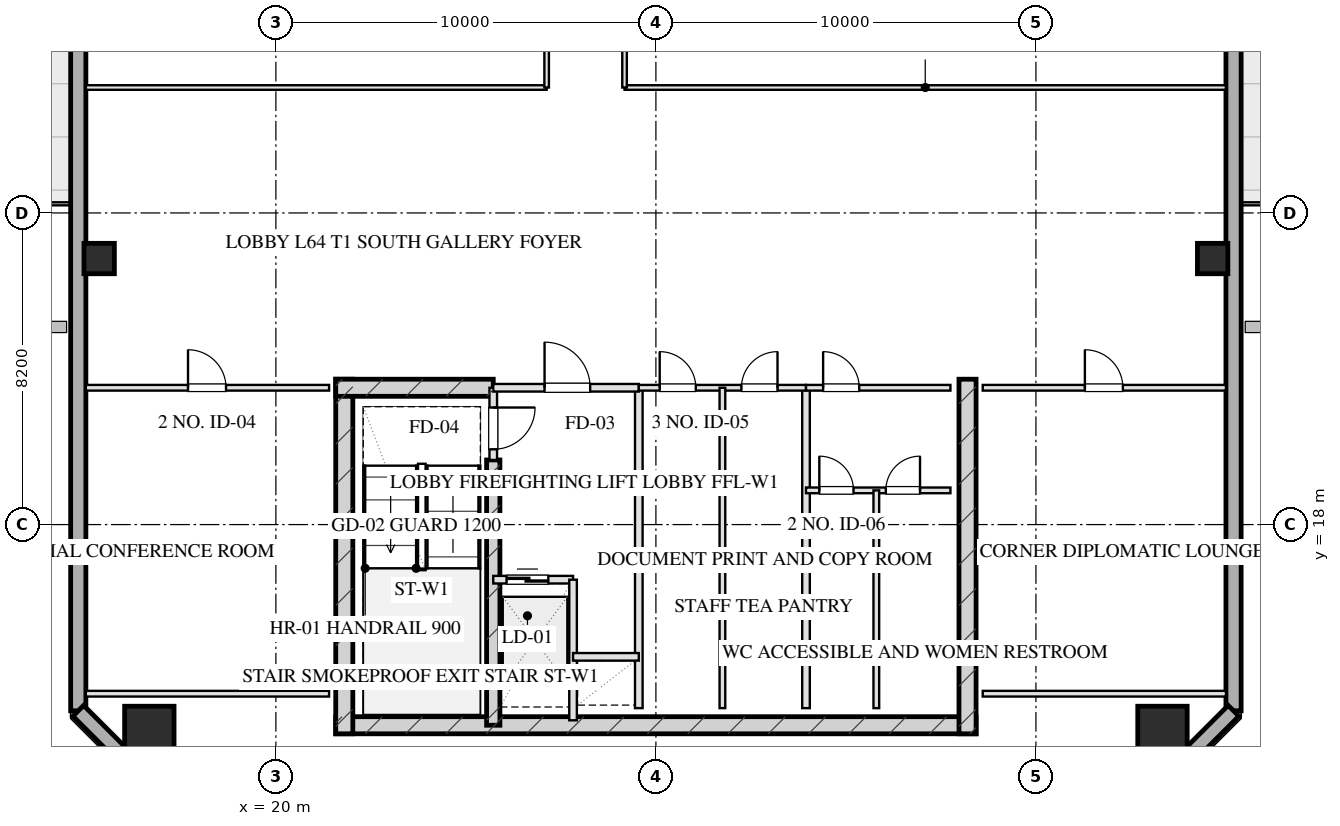
"""IFC4 building model, lengths in metres.
Left out: names, types, materials, properties, quantities, classifications, styles, units other than length and angle.
Written with IfcOpenShell. Run it as: python <this file> out.ifc"""

import sys

from ifc_helpers import new_model, si_unit, direction, frame, frame_2d, origin, origin_2d, place, context, subcontext, project, spatial, rectangle, hollow_rectangle, extrude, element, fill, save


model = new_model("IFC4")
c1 = context("Model", 3, precision=1e-05, world=origin(), true_north=direction((0.0, 1.0)))
c2 = subcontext(c1, "Body", "Model", "MODEL_VIEW")
j1 = project(units=[si_unit("LENGTHUNIT", "METRE"), si_unit("PLANEANGLEUNIT", "RADIAN")], contexts=[c1])
p1 = place(None, origin())
s1 = spatial("IfcSite", under=j1, at=p1, CompositionType="ELEMENT")
p2 = place(p1, origin())
s2 = spatial("IfcBuilding", under=s1, at=p2, CompositionType="ELEMENT")
p3 = place(p2, frame((0.0, 0.0, 237.6)))
s3 = spatial("IfcBuildingStorey", under=s2, at=p3, CompositionType="ELEMENT", Elevation=237.6)
p4 = place(p3, frame((21.575, 12.72, 0.0), z_axis=(0.0, 0.0, 1.0), x_axis=(1.0, 0.0, 0.0)))
e1 = element("IfcWall", 1, at=p4, inside=s3, PredefinedType="SHEAR", context=c2, shape_type="SweptSolid", body=[
    extrude(rectangle(XDim=16.85, YDim=0.45, at=frame_2d((8.425, 0.0))), origin(), (0.0, 0.0, 1.0), 3.2),
])
for number, where, z_axis, x_axis in (
    (2, (21.8, 21.825, 0.0), (0.0, 0.0, 1.0), (0.0, -1.0, 0.0)),
    (3, (38.2, 21.825, 0.0), (0.0, 0.0, 1.0), (0.0, -1.0, 0.0)),
):
    element("IfcWall", number, at=place(p3, frame(where, z_axis=z_axis, x_axis=x_axis)), inside=s3, PredefinedType="SHEAR", context=c2, shape_type="SweptSolid", body=[
        extrude(rectangle(XDim=9.33, YDim=0.45, at=frame_2d((4.665, 0.0))), origin(), (0.0, 0.0, 1.0), 3.2),
    ])
p5 = place(p3, frame((25.72, 19.7, 0.0), z_axis=(0.0, 0.0, 1.0), x_axis=(0.0, -1.0, 0.0)))
e4 = element("IfcWall", 4, at=p5, inside=s3, PredefinedType="SHEAR", context=c2, shape_type="SweptSolid", body=[
    extrude(rectangle(XDim=6.98, YDim=0.35, at=frame_2d((3.49, 0.0))), origin(), (0.0, 0.0, 1.0), 3.2),
])
p6 = place(p3, frame((21.575, 21.6, 0.0), z_axis=(0.0, 0.0, 1.0), x_axis=(1.0, 0.0, 0.0)))
e5 = element("IfcWall", 5, at=p6, inside=s3, PredefinedType="SHEAR", context=c2, shape_type="SweptSolid", body=[
    extrude(rectangle(XDim=4.145, YDim=0.45, at=frame_2d((2.073, 0.0))), origin(), (0.0, 0.0, 1.0), 3.2),
])
for number, where, z_axis, x_axis in (
    (6, (16.67, 12.57, 0.0), (0.0, 0.0, 1.0), (1.0, 0.0, 0.0)),
    (7, (43.33, 12.57, 0.0), (0.0, 0.0, 1.0), (1.0, 0.0, 0.0)),
):
    element("IfcColumn", number, at=place(p3, frame(where, z_axis=z_axis, x_axis=x_axis)), inside=s3, PredefinedType="COLUMN", context=c2, shape_type="SweptSolid", body=[
        extrude(hollow_rectangle(XDim=1.3, YDim=1.3, WallThickness=0.045, at=origin_2d()), origin(), (0.0, 0.0, 1.0), 3.201),
    ])
for number, where, z_axis, x_axis in (
    (8, (15.35, 25.0, 0.0), (0.0, 0.0, 1.0), (1.0, 0.0, 0.0)),
    (9, (44.65, 25.0, 0.0), (0.0, 0.0, 1.0), (1.0, 0.0, 0.0)),
):
    element("IfcColumn", number, at=place(p3, frame(where, z_axis=z_axis, x_axis=x_axis)), inside=s3, PredefinedType="COLUMN", context=c2, shape_type="SweptSolid", body=[
        extrude(hollow_rectangle(XDim=0.8, YDim=0.8, WallThickness=0.028, at=origin_2d()), origin(), (0.0, 0.0, 1.0), 3.201),
    ])
p7 = place(p3, frame((14.8, 13.1, 0.0), z_axis=(0.0, 0.0, 1.0), x_axis=(0.0, 1.0, 0.0)))
e10 = element("IfcWall", 10, at=p7, inside=s3, PredefinedType="SOLIDWALL", context=c2, shape_type="SweptSolid", body=[
    extrude(rectangle(XDim=41.8, YDim=0.4, at=frame_2d((20.9, 0.0))), origin(), (0.0, 0.0, 1.0), 2.36),
])
p8 = place(p7, frame((22.525, 0.0, 0.75)))
e11 = element("IfcOpeningElement", 11, at=p8, cuts=e10, PredefinedType="OPENING", context=c2, shape_type="SweptSolid", body=[
    extrude(rectangle(XDim=1.95, YDim=1.21, at=frame_2d((0.975, 0.605))), frame((0.0, 0.21, 0.0), z_axis=(0.0, -1.0, 0.0), x_axis=(1.0, 0.0, 0.0)), (0.0, 0.0, 1.0), 0.42),
])
p9 = place(p7, frame((26.325, 0.0, 0.75)))
e12 = element("IfcOpeningElement", 12, at=p9, cuts=e10, PredefinedType="OPENING", context=c2, shape_type="SweptSolid", body=[
    extrude(rectangle(XDim=1.95, YDim=1.21, at=frame_2d((0.975, 0.605))), frame((0.0, 0.21, 0.0), z_axis=(0.0, -1.0, 0.0), x_axis=(1.0, 0.0, 0.0)), (0.0, 0.0, 1.0), 0.42),
])
p10 = place(p7, frame((17.5, 0.0, 0.0)))
e13 = element("IfcOpeningElement", 13, at=p10, cuts=e10, PredefinedType="OPENING", context=c2, shape_type="SweptSolid", body=[
    extrude(rectangle(XDim=1.1, YDim=2.15, at=frame_2d((0.55, 1.075))), frame((0.0, 0.21, 0.0), z_axis=(0.0, -1.0, 0.0), x_axis=(1.0, 0.0, 0.0)), (0.0, 0.0, 1.0), 0.42),
])
p11 = place(p3, frame((45.2, 54.9, 0.0), z_axis=(0.0, 0.0, 1.0), x_axis=(0.0, -1.0, 0.0)))
e14 = element("IfcWall", 14, at=p11, inside=s3, PredefinedType="SOLIDWALL", context=c2, shape_type="SweptSolid", body=[
    extrude(rectangle(XDim=41.8, YDim=0.4, at=frame_2d((20.9, 0.0))), origin(), (0.0, 0.0, 1.0), 2.36),
])
p12 = place(p11, frame((17.325, 0.0, 0.75)))
e15 = element("IfcOpeningElement", 15, at=p12, cuts=e14, PredefinedType="OPENING", context=c2, shape_type="SweptSolid", body=[
    extrude(rectangle(XDim=1.95, YDim=1.21, at=frame_2d((0.975, 0.605))), frame((0.0, 0.21, 0.0), z_axis=(0.0, -1.0, 0.0), x_axis=(1.0, 0.0, 0.0)), (0.0, 0.0, 1.0), 0.42),
])
p13 = place(p11, frame((13.525, 0.0, 0.75)))
e16 = element("IfcOpeningElement", 16, at=p13, cuts=e14, PredefinedType="OPENING", context=c2, shape_type="SweptSolid", body=[
    extrude(rectangle(XDim=1.95, YDim=1.21, at=frame_2d((0.975, 0.605))), frame((0.0, 0.21, 0.0), z_axis=(0.0, -1.0, 0.0), x_axis=(1.0, 0.0, 0.0)), (0.0, 0.0, 1.0), 0.42),
])
p14 = place(p11, frame((23.2, 0.0, 0.0)))
e17 = element("IfcOpeningElement", 17, at=p14, cuts=e14, PredefinedType="OPENING", context=c2, shape_type="SweptSolid", body=[
    extrude(rectangle(XDim=1.1, YDim=2.15, at=frame_2d((0.55, 1.075))), frame((0.0, 0.21, 0.0), z_axis=(0.0, -1.0, 0.0), x_axis=(1.0, 0.0, 0.0)), (0.0, 0.0, 1.0), 0.42),
])
for number, where, z_axis, x_axis in (
    (18, (45.2, 13.1, 0.0), (0.0, 0.0, 1.0), (-0.707, -0.707, 0.0)),
    (19, (17.2, 10.7, 0.0), (0.0, 0.0, 1.0), (-0.707, 0.707, 0.0)),
):
    element("IfcWall", number, at=place(p3, frame(where, z_axis=z_axis, x_axis=x_axis)), inside=s3, PredefinedType="SOLIDWALL", context=c2, shape_type="SweptSolid", body=[
        extrude(rectangle(XDim=3.394, YDim=0.4, at=frame_2d((1.697, 0.0))), origin(), (0.0, 0.0, 1.0), 2.36),
    ])
p15 = place(p3, frame((25.72, 21.6, 0.0), z_axis=(0.0, 0.0, 1.0), x_axis=(0.0, -1.0, 0.0)))
e20 = element("IfcWall", 20, at=p15, inside=s3, PredefinedType="PARTITIONING", context=c2, shape_type="SweptSolid", body=[
    extrude(rectangle(XDim=1.9, YDim=0.2, at=frame_2d((0.95, 0.0))), origin(), (0.0, 0.0, 1.0), 2.925),
])
p16 = place(p15, frame((0.52, 0.0, 0.0)))
e21 = element("IfcOpeningElement", 21, at=p16, cuts=e20, PredefinedType="OPENING", context=c2, shape_type="SweptSolid", body=[
    extrude(rectangle(XDim=1.1, YDim=2.05, at=frame_2d((0.55, 1.025))), frame((0.0, 0.11, 0.0), z_axis=(0.0, -1.0, 0.0), x_axis=(1.0, 0.0, 0.0)), (0.0, 0.0, 1.0), 0.22),
])
p17 = place(p3, frame((29.55, 21.6, 0.0), z_axis=(0.0, 0.0, 1.0), x_axis=(0.0, -1.0, 0.0)))
e22 = element("IfcWall", 22, at=p17, inside=s3, PredefinedType="PARTITIONING", context=c2, shape_type="SweptSolid", body=[
    extrude(rectangle(XDim=8.43, YDim=0.2, at=frame_2d((4.215, 0.0))), origin(), (0.0, 0.0, 1.0), 2.925),
])
p18 = place(p3, frame((25.72, 21.6, 0.0), z_axis=(0.0, 0.0, 1.0), x_axis=(1.0, 0.0, 0.0)))
e23 = element("IfcWall", 23, at=p18, inside=s3, PredefinedType="PARTITIONING", context=c2, shape_type="SweptSolid", body=[
    extrude(rectangle(XDim=3.83, YDim=0.2, at=frame_2d((1.915, 0.0))), origin(), (0.0, 0.0, 1.0), 2.925),
])
p19 = place(p18, frame((1.35, 0.0, 0.0)))
e24 = element("IfcOpeningElement", 24, at=p19, cuts=e23, PredefinedType="OPENING", context=c2, shape_type="SweptSolid", body=[
    extrude(rectangle(XDim=1.2, YDim=2.05, at=frame_2d((0.6, 1.025))), frame((0.0, 0.11, 0.0), z_axis=(0.0, -1.0, 0.0), x_axis=(1.0, 0.0, 0.0)), (0.0, 0.0, 1.0), 0.22),
])
p20 = place(p3, frame((25.72, 16.55, 0.0), z_axis=(0.0, 0.0, 1.0), x_axis=(1.0, 0.0, 0.0)))
e25 = element("IfcWall", 25, at=p20, inside=s3, PredefinedType="PARTITIONING", context=c2, shape_type="SweptSolid", body=[
    extrude(rectangle(XDim=2.1, YDim=0.2, at=frame_2d((1.05, 0.0))), origin(), (0.0, 0.0, 1.0), 2.925),
])
p21 = place(p20, frame((0.35, 0.0, 0.0)))
e26 = element("IfcOpeningElement", 26, at=p21, cuts=e25, PredefinedType="OPENING", context=c2, shape_type="SweptSolid", body=[
    extrude(rectangle(XDim=1.1, YDim=2.05, at=frame_2d((0.55, 1.025))), frame((0.0, 0.11, 0.0), z_axis=(0.0, -1.0, 0.0), x_axis=(1.0, 0.0, 0.0)), (0.0, 0.0, 1.0), 0.22),
])
p22 = place(p3, frame((27.82, 16.55, 0.0), z_axis=(0.0, 0.0, 1.0), x_axis=(0.0, -1.0, 0.0)))
e27 = element("IfcWall", 27, at=p22, inside=s3, PredefinedType="PARTITIONING", context=c2, shape_type="SweptSolid", body=[
    extrude(rectangle(XDim=3.7, YDim=0.2, at=frame_2d((1.85, 0.0))), origin(), (0.0, 0.0, 1.0), 2.925),
])
p23 = place(p3, frame((27.82, 14.52, 0.0), z_axis=(0.0, 0.0, 1.0), x_axis=(1.0, 0.0, 0.0)))
e28 = element("IfcWall", 28, at=p23, inside=s3, PredefinedType="PARTITIONING", context=c2, shape_type="SweptSolid", body=[
    extrude(rectangle(XDim=1.73, YDim=0.2, at=frame_2d((0.865, 0.0))), origin(), (0.0, 0.0, 1.0), 2.925),
])
p24 = place(p3, frame((33.95, 21.6, 0.0), z_axis=(0.0, 0.0, 1.0), x_axis=(0.0, -1.0, 0.0)))
e29 = element("IfcWall", 29, at=p24, inside=s3, PredefinedType="PARTITIONING", context=c2, shape_type="SweptSolid", body=[
    extrude(rectangle(XDim=8.43, YDim=0.2, at=frame_2d((4.215, 0.0))), origin(), (0.0, 0.0, 1.0), 2.925),
])
p25 = place(p3, frame((29.55, 21.6, 0.0), z_axis=(0.0, 0.0, 1.0), x_axis=(1.0, 0.0, 0.0)))
e30 = element("IfcWall", 30, at=p25, inside=s3, PredefinedType="PARTITIONING", context=c2, shape_type="SweptSolid", body=[
    extrude(rectangle(XDim=4.4, YDim=0.15, at=frame_2d((2.2, 0.0))), origin(), (0.0, 0.0, 1.0), 2.925),
])
p26 = place(p25, frame((0.55, 0.0, 0.0)))
e31 = element("IfcOpeningElement", 31, at=p26, cuts=e30, PredefinedType="OPENING", context=c2, shape_type="SweptSolid", body=[
    extrude(rectangle(XDim=0.95, YDim=2.05, at=frame_2d((0.475, 1.025))), frame((0.0, 0.085, 0.0), z_axis=(0.0, -1.0, 0.0), x_axis=(1.0, 0.0, 0.0)), (0.0, 0.0, 1.0), 0.17),
])
p27 = place(p25, frame((2.7, 0.0, 0.0)))
e32 = element("IfcOpeningElement", 32, at=p27, cuts=e30, PredefinedType="OPENING", context=c2, shape_type="SweptSolid", body=[
    extrude(rectangle(XDim=0.95, YDim=2.05, at=frame_2d((0.475, 1.025))), frame((0.0, 0.085, 0.0), z_axis=(0.0, -1.0, 0.0), x_axis=(1.0, 0.0, 0.0)), (0.0, 0.0, 1.0), 0.17),
])
p28 = place(p3, frame((31.75, 21.6, 0.0), z_axis=(0.0, 0.0, 1.0), x_axis=(0.0, -1.0, 0.0)))
e33 = element("IfcWall", 33, at=p28, inside=s3, PredefinedType="PARTITIONING", context=c2, shape_type="SweptSolid", body=[
    extrude(rectangle(XDim=8.43, YDim=0.15, at=frame_2d((4.215, 0.0))), origin(), (0.0, 0.0, 1.0), 2.925),
])
p29 = place(p3, frame((33.95, 21.6, 0.0), z_axis=(0.0, 0.0, 1.0), x_axis=(1.0, 0.0, 0.0)))
e34 = element("IfcWall", 34, at=p29, inside=s3, PredefinedType="PARTITIONING", context=c2, shape_type="SweptSolid", body=[
    extrude(rectangle(XDim=3.8, YDim=0.15, at=frame_2d((1.9, 0.0))), origin(), (0.0, 0.0, 1.0), 2.925),
])
p30 = place(p29, frame((0.45, 0.0, 0.0)))
e35 = element("IfcOpeningElement", 35, at=p30, cuts=e34, PredefinedType="OPENING", context=c2, shape_type="SweptSolid", body=[
    extrude(rectangle(XDim=0.95, YDim=2.05, at=frame_2d((0.475, 1.025))), frame((0.0, 0.085, 0.0), z_axis=(0.0, -1.0, 0.0), x_axis=(1.0, 0.0, 0.0)), (0.0, 0.0, 1.0), 0.17),
])
p31 = place(p3, frame((33.95, 18.9, 0.0), z_axis=(0.0, 0.0, 1.0), x_axis=(1.0, 0.0, 0.0)))
e36 = element("IfcWall", 36, at=p31, inside=s3, PredefinedType="PARTITIONING", context=c2, shape_type="SweptSolid", body=[
    extrude(rectangle(XDim=3.8, YDim=0.15, at=frame_2d((1.9, 0.0))), origin(), (0.0, 0.0, 1.0), 2.925),
])
p32 = place(p31, frame((0.35, 0.0, 0.0)))
e37 = element("IfcOpeningElement", 37, at=p32, cuts=e36, PredefinedType="OPENING", context=c2, shape_type="SweptSolid", body=[
    extrude(rectangle(XDim=0.9, YDim=2.05, at=frame_2d((0.45, 1.025))), frame((0.0, 0.085, 0.0), z_axis=(0.0, -1.0, 0.0), x_axis=(1.0, 0.0, 0.0)), (0.0, 0.0, 1.0), 0.17),
])
p33 = place(p31, frame((2.1, 0.0, 0.0)))
e38 = element("IfcOpeningElement", 38, at=p33, cuts=e36, PredefinedType="OPENING", context=c2, shape_type="SweptSolid", body=[
    extrude(rectangle(XDim=0.9, YDim=2.05, at=frame_2d((0.45, 1.025))), frame((0.0, 0.085, 0.0), z_axis=(0.0, -1.0, 0.0), x_axis=(1.0, 0.0, 0.0)), (0.0, 0.0, 1.0), 0.17),
])
p34 = place(p3, frame((35.8, 18.9, 0.0), z_axis=(0.0, 0.0, 1.0), x_axis=(0.0, -1.0, 0.0)))
e39 = element("IfcWall", 39, at=p34, inside=s3, PredefinedType="PARTITIONING", context=c2, shape_type="SweptSolid", body=[
    extrude(rectangle(XDim=5.73, YDim=0.15, at=frame_2d((2.865, 0.0))), origin(), (0.0, 0.0, 1.0), 2.925),
])
p35 = place(p3, frame((15.0, 13.55, 0.0), z_axis=(0.0, 0.0, 1.0), x_axis=(1.0, 0.0, 0.0)))
e40 = element("IfcWall", 40, at=p35, inside=s3, PredefinedType="PARTITIONING", context=c2, shape_type="SweptSolid", body=[
    extrude(rectangle(XDim=6.4, YDim=0.15, at=frame_2d((3.2, 0.0))), origin(), (0.0, 0.0, 1.0), 2.925),
])
p36 = place(p3, frame((15.0, 21.6, 0.0), z_axis=(0.0, 0.0, 1.0), x_axis=(1.0, 0.0, 0.0)))
e41 = element("IfcWall", 41, at=p36, inside=s3, PredefinedType="PARTITIONING", context=c2, shape_type="SweptSolid", body=[
    extrude(rectangle(XDim=6.4, YDim=0.15, at=frame_2d((3.2, 0.0))), origin(), (0.0, 0.0, 1.0), 2.925),
])
p37 = place(p36, frame((2.688, 0.0, 0.0)))
e42 = element("IfcOpeningElement", 42, at=p37, cuts=e41, PredefinedType="OPENING", context=c2, shape_type="SweptSolid", body=[
    extrude(rectangle(XDim=1.0, YDim=2.05, at=frame_2d((0.5, 1.025))), frame((0.0, 0.085, 0.0), z_axis=(0.0, -1.0, 0.0), x_axis=(1.0, 0.0, 0.0)), (0.0, 0.0, 1.0), 0.17),
])
p38 = place(p3, frame((38.6, 13.55, 0.0), z_axis=(0.0, 0.0, 1.0), x_axis=(1.0, 0.0, 0.0)))
e43 = element("IfcWall", 43, at=p38, inside=s3, PredefinedType="PARTITIONING", context=c2, shape_type="SweptSolid", body=[
    extrude(rectangle(XDim=6.4, YDim=0.15, at=frame_2d((3.2, 0.0))), origin(), (0.0, 0.0, 1.0), 2.925),
])
p39 = place(p3, frame((38.6, 21.6, 0.0), z_axis=(0.0, 0.0, 1.0), x_axis=(1.0, 0.0, 0.0)))
e44 = element("IfcWall", 44, at=p39, inside=s3, PredefinedType="PARTITIONING", context=c2, shape_type="SweptSolid", body=[
    extrude(rectangle(XDim=6.4, YDim=0.15, at=frame_2d((3.2, 0.0))), origin(), (0.0, 0.0, 1.0), 2.925),
])
p40 = place(p39, frame((2.688, 0.0, 0.0)))
e45 = element("IfcOpeningElement", 45, at=p40, cuts=e44, PredefinedType="OPENING", context=c2, shape_type="SweptSolid", body=[
    extrude(rectangle(XDim=1.0, YDim=2.05, at=frame_2d((0.5, 1.025))), frame((0.0, 0.085, 0.0), z_axis=(0.0, -1.0, 0.0), x_axis=(1.0, 0.0, 0.0)), (0.0, 0.0, 1.0), 0.17),
])
p41 = place(p3, frame((15.0, 29.5, 0.0), z_axis=(0.0, 0.0, 1.0), x_axis=(1.0, 0.0, 0.0)))
e46 = element("IfcWall", 46, at=p41, inside=s3, PredefinedType="PARTITIONING", context=c2, shape_type="SweptSolid", body=[
    extrude(rectangle(XDim=12.125, YDim=0.12, at=frame_2d((6.062, 0.0))), origin(), (0.0, 0.0, 1.0), 2.925),
])
p42 = place(p3, frame((29.175, 29.5, 0.0), z_axis=(0.0, 0.0, 1.0), x_axis=(1.0, 0.0, 0.0)))
e47 = element("IfcWall", 47, at=p42, inside=s3, PredefinedType="PARTITIONING", context=c2, shape_type="SweptSolid", body=[
    extrude(rectangle(XDim=15.825, YDim=0.12, at=frame_2d((7.913, 0.0))), origin(), (0.0, 0.0, 1.0), 2.925),
])
p43 = place(p3, frame((27.125, 29.5, 0.0), z_axis=(0.0, 0.0, 1.0), x_axis=(0.0, 1.0, 0.0)))
e48 = element("IfcWall", 48, at=p43, inside=s3, PredefinedType="PARTITIONING", context=c2, shape_type="SweptSolid", body=[
    extrude(rectangle(XDim=9.0, YDim=0.12, at=frame_2d((4.5, 0.0))), origin(), (0.0, 0.0, 1.0), 2.925),
])
p44 = place(p43, frame((2.335, 0.0, 0.0)))
e49 = element("IfcOpeningElement", 49, at=p44, cuts=e48, PredefinedType="OPENING", context=c2, shape_type="SweptSolid", body=[
    extrude(rectangle(XDim=1.0, YDim=2.05, at=frame_2d((0.5, 1.025))), frame((0.0, 0.07, 0.0), z_axis=(0.0, -1.0, 0.0), x_axis=(1.0, 0.0, 0.0)), (0.0, 0.0, 1.0), 0.14),
])
p45 = place(p43, frame((6.835, 0.0, 0.0)))
e50 = element("IfcOpeningElement", 50, at=p45, cuts=e48, PredefinedType="OPENING", context=c2, shape_type="SweptSolid", body=[
    extrude(rectangle(XDim=1.0, YDim=2.05, at=frame_2d((0.5, 1.025))), frame((0.0, 0.07, 0.0), z_axis=(0.0, -1.0, 0.0), x_axis=(1.0, 0.0, 0.0)), (0.0, 0.0, 1.0), 0.14),
])
p46 = place(p3, frame((29.175, 29.5, 0.0), z_axis=(0.0, 0.0, 1.0), x_axis=(0.0, 1.0, 0.0)))
e51 = element("IfcWall", 51, at=p46, inside=s3, PredefinedType="PARTITIONING", context=c2, shape_type="SweptSolid", body=[
    extrude(rectangle(XDim=9.0, YDim=0.12, at=frame_2d((4.5, 0.0))), origin(), (0.0, 0.0, 1.0), 2.925),
])
p47 = place(p46, frame((1.165, 0.0, 0.0)))
e52 = element("IfcOpeningElement", 52, at=p47, cuts=e51, PredefinedType="OPENING", context=c2, shape_type="SweptSolid", body=[
    extrude(rectangle(XDim=1.0, YDim=2.05, at=frame_2d((0.5, 1.025))), frame((0.0, 0.07, 0.0), z_axis=(0.0, -1.0, 0.0), x_axis=(1.0, 0.0, 0.0)), (0.0, 0.0, 1.0), 0.14),
])
p48 = place(p46, frame((4.0, 0.0, 0.0)))
e53 = element("IfcOpeningElement", 53, at=p48, cuts=e51, PredefinedType="OPENING", context=c2, shape_type="SweptSolid", body=[
    extrude(rectangle(XDim=1.0, YDim=2.05, at=frame_2d((0.5, 1.025))), frame((0.0, 0.07, 0.0), z_axis=(0.0, -1.0, 0.0), x_axis=(1.0, 0.0, 0.0)), (0.0, 0.0, 1.0), 0.14),
])
p49 = place(p46, frame((6.835, 0.0, 0.0)))
e54 = element("IfcOpeningElement", 54, at=p49, cuts=e51, PredefinedType="OPENING", context=c2, shape_type="SweptSolid", body=[
    extrude(rectangle(XDim=1.0, YDim=2.05, at=frame_2d((0.5, 1.025))), frame((0.0, 0.07, 0.0), z_axis=(0.0, -1.0, 0.0), x_axis=(1.0, 0.0, 0.0)), (0.0, 0.0, 1.0), 0.14),
])
p50 = place(p16, origin())
e55 = element("IfcDoor", 55, at=p50, inside=s3, OperationType="SINGLE_SWING_LEFT", PredefinedType="DOOR", context=c2, shape_type="SweptSolid", body=[
    extrude(rectangle(XDim=1.1, YDim=2.05, at=frame_2d((0.55, 1.025))), frame((0.0, 0.025, 0.0), z_axis=(0.0, -1.0, 0.0), x_axis=(1.0, 0.0, 0.0)), (0.0, 0.0, 1.0), 0.05),
])
fill(e21, e55)
p51 = place(p19, origin())
e56 = element("IfcDoor", 56, at=p51, inside=s3, OperationType="SINGLE_SWING_LEFT", PredefinedType="DOOR", context=c2, shape_type="SweptSolid", body=[
    extrude(rectangle(XDim=1.2, YDim=2.05, at=frame_2d((0.6, 1.025))), frame((0.0, 0.025, 0.0), z_axis=(0.0, -1.0, 0.0), x_axis=(1.0, 0.0, 0.0)), (0.0, 0.0, 1.0), 0.05),
])
fill(e24, e56)
p52 = place(p21, origin())
e57 = element("IfcDoor", 57, at=p52, inside=s3, OperationType="DOUBLE_DOOR_SLIDING", PredefinedType="DOOR", context=c2, shape_type="SweptSolid", body=[
    extrude(rectangle(XDim=1.1, YDim=2.05, at=frame_2d((0.55, 1.025))), frame((0.0, 0.025, 0.0), z_axis=(0.0, -1.0, 0.0), x_axis=(1.0, 0.0, 0.0)), (0.0, 0.0, 1.0), 0.05),
])
fill(e26, e57)
p53 = place(p26, origin())
e58 = element("IfcDoor", 58, at=p53, inside=s3, OperationType="SINGLE_SWING_LEFT", PredefinedType="DOOR", context=c2, shape_type="SweptSolid", body=[
    extrude(rectangle(XDim=0.95, YDim=2.05, at=frame_2d((0.475, 1.025))), frame((0.0, 0.025, 0.0), z_axis=(0.0, -1.0, 0.0), x_axis=(1.0, 0.0, 0.0)), (0.0, 0.0, 1.0), 0.05),
])
fill(e31, e58)
p54 = place(p27, origin())
e59 = element("IfcDoor", 59, at=p54, inside=s3, OperationType="SINGLE_SWING_RIGHT", PredefinedType="DOOR", context=c2, shape_type="SweptSolid", body=[
    extrude(rectangle(XDim=0.95, YDim=2.05, at=frame_2d((0.475, 1.025))), frame((0.0, 0.025, 0.0), z_axis=(0.0, -1.0, 0.0), x_axis=(1.0, 0.0, 0.0)), (0.0, 0.0, 1.0), 0.05),
])
fill(e32, e59)
p55 = place(p30, origin())
e60 = element("IfcDoor", 60, at=p55, inside=s3, OperationType="SINGLE_SWING_LEFT", PredefinedType="DOOR", context=c2, shape_type="SweptSolid", body=[
    extrude(rectangle(XDim=0.95, YDim=2.05, at=frame_2d((0.475, 1.025))), frame((0.0, 0.025, 0.0), z_axis=(0.0, -1.0, 0.0), x_axis=(1.0, 0.0, 0.0)), (0.0, 0.0, 1.0), 0.05),
])
fill(e35, e60)
p56 = place(p32, origin())
e61 = element("IfcDoor", 61, at=p56, inside=s3, OperationType="SINGLE_SWING_LEFT", PredefinedType="DOOR", context=c2, shape_type="SweptSolid", body=[
    extrude(rectangle(XDim=0.9, YDim=2.05, at=frame_2d((0.45, 1.025))), frame((0.0, 0.025, 0.0), z_axis=(0.0, -1.0, 0.0), x_axis=(1.0, 0.0, 0.0)), (0.0, 0.0, 1.0), 0.05),
])
fill(e37, e61)
p57 = place(p33, origin())
e62 = element("IfcDoor", 62, at=p57, inside=s3, OperationType="SINGLE_SWING_RIGHT", PredefinedType="DOOR", context=c2, shape_type="SweptSolid", body=[
    extrude(rectangle(XDim=0.9, YDim=2.05, at=frame_2d((0.45, 1.025))), frame((0.0, 0.025, 0.0), z_axis=(0.0, -1.0, 0.0), x_axis=(1.0, 0.0, 0.0)), (0.0, 0.0, 1.0), 0.05),
])
fill(e38, e62)
p58 = place(p37, origin())
e63 = element("IfcDoor", 63, at=p58, inside=s3, OperationType="SINGLE_SWING_LEFT", PredefinedType="DOOR", context=c2, shape_type="SweptSolid", body=[
    extrude(rectangle(XDim=1.0, YDim=2.05, at=frame_2d((0.5, 1.025))), frame((0.0, 0.025, 0.0), z_axis=(0.0, -1.0, 0.0), x_axis=(1.0, 0.0, 0.0)), (0.0, 0.0, 1.0), 0.05),
])
fill(e42, e63)
p59 = place(p40, origin())
e64 = element("IfcDoor", 64, at=p59, inside=s3, OperationType="SINGLE_SWING_LEFT", PredefinedType="DOOR", context=c2, shape_type="SweptSolid", body=[
    extrude(rectangle(XDim=1.0, YDim=2.05, at=frame_2d((0.5, 1.025))), frame((0.0, 0.025, 0.0), z_axis=(0.0, -1.0, 0.0), x_axis=(1.0, 0.0, 0.0)), (0.0, 0.0, 1.0), 0.05),
])
fill(e45, e64)
save(model, sys.argv[1])
